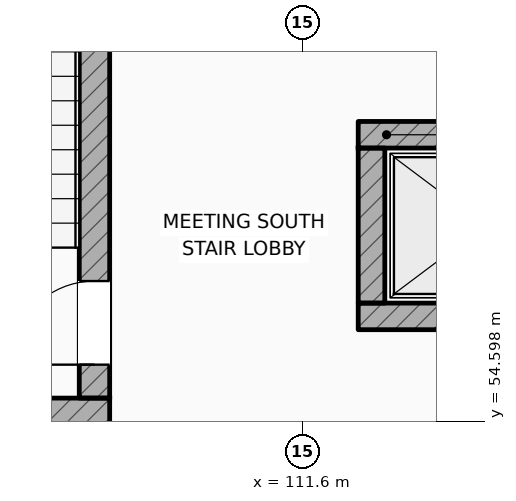
"""IFC4 building model, lengths in metres.
Left out: names, types, materials, properties, quantities, classifications, styles, units other than length and angle.
Written with IfcOpenShell. Run it as: python <this file> out.ifc"""

import sys

from ifc_helpers import new_model, si_unit, direction, frame, frame_2d, origin, place, context, subcontext, project, spatial, rectangle, extrude, element, fill, save


model = new_model("IFC4")
c1 = context("Model", 3, precision=1e-05, world=origin(), true_north=direction((0.0, 1.0)))
c2 = subcontext(c1, "Body", "Model", "MODEL_VIEW")
j1 = project(units=[si_unit("LENGTHUNIT", "METRE"), si_unit("PLANEANGLEUNIT", "RADIAN")], contexts=[c1])
p1 = place(None, origin())
s1 = spatial("IfcSite", under=j1, at=p1, CompositionType="ELEMENT")
p2 = place(p1, origin())
s2 = spatial("IfcBuilding", under=s1, at=p2, CompositionType="ELEMENT")
p3 = place(p2, frame((0.0, 0.0, 16.2)))
s3 = spatial("IfcBuildingStorey", under=s2, at=p3, CompositionType="ELEMENT", Elevation=16.2)
p4 = place(p3, frame((104.1, 54.7, 0.0), z_axis=(0.0, 0.0, 1.0), x_axis=(1.0, 0.0, 0.0)))
e1 = element("IfcWall", 1, at=p4, inside=s3, PredefinedType="SHEAR", context=c2, shape_type="SweptSolid", body=[
    extrude(rectangle(XDim=4.96, YDim=0.4, at=frame_2d((2.48, 0.0))), origin(), (0.0, 0.0, 1.0), 4.2),
])
p5 = place(p3, frame((108.86, 54.9, 0.0), z_axis=(0.0, 0.0, 1.0), x_axis=(0.0, 1.0, 0.0)))
e2 = element("IfcWall", 2, at=p5, inside=s3, PredefinedType="SHEAR", context=c2, shape_type="SweptSolid", body=[
    extrude(rectangle(XDim=9.112, YDim=0.4, at=frame_2d((4.556, 0.0))), origin(), (0.0, 0.0, 1.0), 4.2),
])
p6 = place(p5, frame((0.44, 0.0, 0.0)))
e3 = element("IfcOpeningElement", 3, at=p6, cuts=e2, PredefinedType="OPENING", context=c2, shape_type="SweptSolid", body=[
    extrude(rectangle(XDim=1.1, YDim=2.2, at=frame_2d((0.55, 1.1))), frame((0.0, 0.21, 0.0), z_axis=(0.0, -1.0, 0.0), x_axis=(1.0, 0.0, 0.0)), (0.0, 0.0, 1.0), 0.42),
])
p7 = place(p3, frame((112.33, 58.365, 0.0), z_axis=(0.0, 0.0, 1.0), x_axis=(1.0, 0.0, 0.0)))
e4 = element("IfcWall", 4, at=p7, inside=s3, PredefinedType="SHEAR", context=c2, shape_type="SweptSolid", body=[
    extrude(rectangle(XDim=3.34, YDim=0.35, at=frame_2d((1.67, 0.0))), origin(), (0.0, 0.0, 1.0), 3.92),
])
p8 = place(p7, frame((1.045, 0.0, 0.0)))
e5 = element("IfcOpeningElement", 5, at=p8, cuts=e4, PredefinedType="OPENING", context=c2, shape_type="SweptSolid", body=[
    extrude(rectangle(XDim=1.25, YDim=2.25, at=frame_2d((0.625, 1.125))), frame((0.0, 0.185, 0.0), z_axis=(0.0, -1.0, 0.0), x_axis=(1.0, 0.0, 0.0)), (0.0, 0.0, 1.0), 0.37),
])
p9 = place(p3, frame((112.33, 55.975, 0.0), z_axis=(0.0, 0.0, 1.0), x_axis=(1.0, 0.0, 0.0)))
e6 = element("IfcWall", 6, at=p9, inside=s3, PredefinedType="SHEAR", context=c2, shape_type="SweptSolid", body=[
    extrude(rectangle(XDim=3.34, YDim=0.35, at=frame_2d((1.67, 0.0))), origin(), (0.0, 0.0, 1.0), 3.92),
])
p10 = place(p3, frame((112.505, 56.15, 0.0), z_axis=(0.0, 0.0, 1.0), x_axis=(0.0, 1.0, 0.0)))
e7 = element("IfcWall", 7, at=p10, inside=s3, PredefinedType="SHEAR", context=c2, shape_type="SweptSolid", body=[
    extrude(rectangle(XDim=2.04, YDim=0.35, at=frame_2d((1.02, 0.0))), origin(), (0.0, 0.0, 1.0), 3.92),
])
p11 = place(p6, origin())
e8 = element("IfcDoor", 8, at=p11, inside=s3, OperationType="SINGLE_SWING_LEFT", PredefinedType="DOOR", context=c2, shape_type="SweptSolid", body=[
    extrude(rectangle(XDim=1.1, YDim=2.2, at=frame_2d((0.55, 1.1))), frame((0.0, 0.025, 0.0), z_axis=(0.0, -1.0, 0.0), x_axis=(1.0, 0.0, 0.0)), (0.0, 0.0, 1.0), 0.05),
])
fill(e3, e8)
save(model, sys.argv[1])
